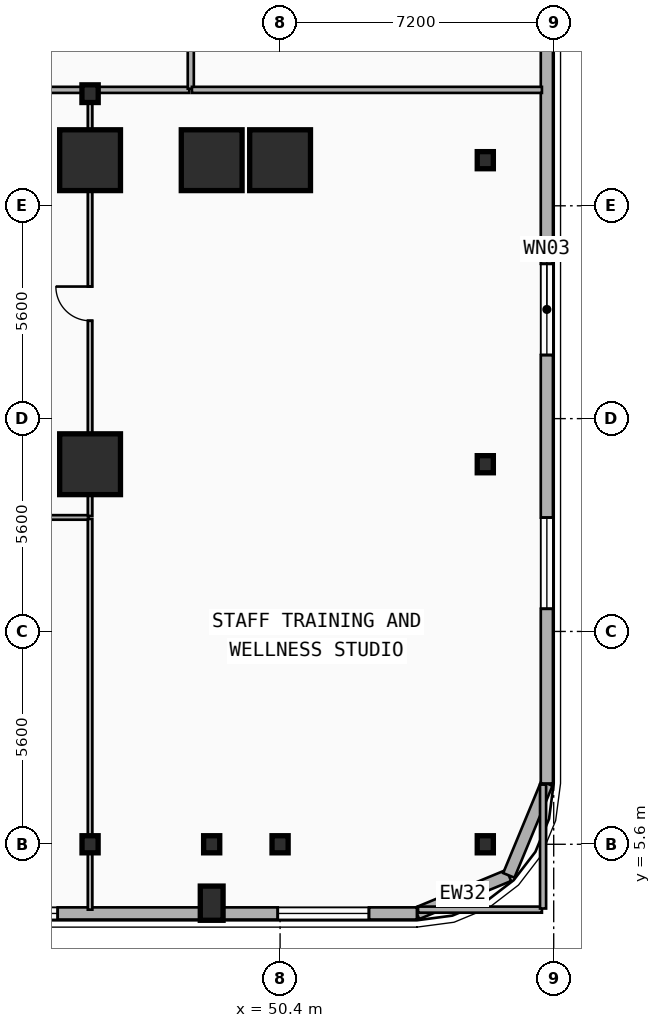
"""IFC4 building model, lengths in metres.
Left out: names, types, materials, properties, quantities, classifications, styles, units other than length and angle.
Written with IfcOpenShell. Run it as: python <this file> out.ifc"""

import sys

from ifc_helpers import new_model, si_unit, direction, frame, frame_2d, origin, origin_2d, place, context, subcontext, project, spatial, rectangle, i_section, extrude, element, fill, save


model = new_model("IFC4")
c1 = context("Model", 3, precision=1e-05, world=origin(), true_north=direction((0.0, 1.0)))
c2 = subcontext(c1, "Body", "Model", "MODEL_VIEW")
j1 = project(units=[si_unit("LENGTHUNIT", "METRE"), si_unit("PLANEANGLEUNIT", "RADIAN")], contexts=[c1])
p1 = place(None, origin())
s1 = spatial("IfcSite", under=j1, at=p1, CompositionType="ELEMENT")
p2 = place(p1, origin())
s2 = spatial("IfcBuilding", under=s1, at=p2, CompositionType="ELEMENT")
p3 = place(p2, frame((0.0, 0.0, 24.2)))
s3 = spatial("IfcBuildingStorey", under=s2, at=p3, CompositionType="ELEMENT", Elevation=24.2)
p4 = place(p3, frame((45.4, 25.35, 0.0), z_axis=(0.0, 0.0, 1.0), x_axis=(1.0, 0.0, 0.0)))
e1 = element("IfcColumn", 1, at=p4, inside=s3, PredefinedType="COLUMN", context=c2, shape_type="SweptSolid", body=[
    extrude(i_section(OverallWidth=0.428, OverallDepth=0.465, WebThickness=0.045, FlangeThickness=0.073, FilletRadius=0.015, at=origin_2d()), origin(), (0.0, 0.0, 1.0), 4.8),
])
p5 = place(p3, frame((45.4, 5.6, 0.0), z_axis=(0.0, 0.0, 1.0), x_axis=(1.0, 0.0, 0.0)))
e2 = element("IfcColumn", 2, at=p5, inside=s3, PredefinedType="COLUMN", context=c2, shape_type="SweptSolid", body=[
    extrude(i_section(OverallWidth=0.424, OverallDepth=0.45, WebThickness=0.041, FlangeThickness=0.065, FilletRadius=0.015, at=origin_2d()), origin(), (0.0, 0.0, 1.0), 4.8),
])
p6 = place(p3, frame((45.4, 15.6, 0.0), z_axis=(0.0, 0.0, 1.0), x_axis=(1.0, 0.0, 0.0)))
e3 = element("IfcColumn", 3, at=p6, inside=s3, PredefinedType="COLUMN", context=c2, shape_type="SweptSolid", body=[
    extrude(rectangle(XDim=1.6, YDim=1.6, at=origin_2d()), origin(), (0.0, 0.0, 1.0), 4.8),
])
p7 = place(p3, frame((45.4, 23.6, 0.0), z_axis=(0.0, 0.0, 1.0), x_axis=(1.0, 0.0, 0.0)))
e4 = element("IfcColumn", 4, at=p7, inside=s3, PredefinedType="COLUMN", context=c2, shape_type="SweptSolid", body=[
    extrude(rectangle(XDim=1.6, YDim=1.6, at=origin_2d()), origin(), (0.0, 0.0, 1.0), 4.732),
])
p8 = place(p3, frame((48.6, 5.6, 0.0), z_axis=(0.0, 0.0, 1.0), x_axis=(1.0, 0.0, 0.0)))
e5 = element("IfcColumn", 5, at=p8, inside=s3, PredefinedType="COLUMN", context=c2, shape_type="SweptSolid", body=[
    extrude(i_section(OverallWidth=0.424, OverallDepth=0.45, WebThickness=0.041, FlangeThickness=0.065, FilletRadius=0.015, at=origin_2d()), origin(), (0.0, 0.0, 1.0), 4.8),
])
p9 = place(p3, frame((48.6, 23.6, 0.0), z_axis=(0.0, 0.0, 1.0), x_axis=(1.0, 0.0, 0.0)))
e6 = element("IfcColumn", 6, at=p9, inside=s3, PredefinedType="COLUMN", context=c2, shape_type="SweptSolid", body=[
    extrude(rectangle(XDim=1.6, YDim=1.6, at=origin_2d()), origin(), (0.0, 0.0, 1.0), 4.8),
])
p10 = place(p3, frame((50.4, 5.6, 0.0), z_axis=(0.0, 0.0, 1.0), x_axis=(1.0, 0.0, 0.0)))
e7 = element("IfcColumn", 7, at=p10, inside=s3, PredefinedType="COLUMN", context=c2, shape_type="SweptSolid", body=[
    extrude(i_section(OverallWidth=0.424, OverallDepth=0.45, WebThickness=0.041, FlangeThickness=0.065, FilletRadius=0.015, at=origin_2d()), origin(), (0.0, 0.0, 1.0), 4.8),
])
p11 = place(p3, frame((50.4, 23.6, 0.0), z_axis=(0.0, 0.0, 1.0), x_axis=(1.0, 0.0, 0.0)))
e8 = element("IfcColumn", 8, at=p11, inside=s3, PredefinedType="COLUMN", context=c2, shape_type="SweptSolid", body=[
    extrude(rectangle(XDim=1.6, YDim=1.6, at=origin_2d()), origin(), (0.0, 0.0, 1.0), 4.732),
])
for number, where, z_axis, x_axis in (
    (9, (55.8, 5.6, 0.0), (0.0, 0.0, 1.0), (1.0, 0.0, 0.0)),
    (10, (55.8, 15.6, 0.0), (0.0, 0.0, 1.0), (1.0, 0.0, 0.0)),
    (11, (55.8, 23.6, 0.0), (0.0, 0.0, 1.0), (1.0, 0.0, 0.0)),
):
    element("IfcColumn", number, at=place(p3, frame(where, z_axis=z_axis, x_axis=x_axis)), inside=s3, PredefinedType="COLUMN", context=c2, shape_type="SweptSolid", body=[
        extrude(i_section(OverallWidth=0.424, OverallDepth=0.45, WebThickness=0.041, FlangeThickness=0.065, FilletRadius=0.015, at=origin_2d()), origin(), (0.0, 0.0, 1.0), 4.8),
    ])
p12 = place(p3, frame((48.6, 4.05, 0.0), z_axis=(0.0, 0.0, 1.0), x_axis=(1.0, 0.0, 0.0)))
e12 = element("IfcColumn", 12, at=p12, inside=s3, PredefinedType="PILASTER", context=c2, shape_type="SweptSolid", body=[
    extrude(rectangle(XDim=0.6, YDim=0.9, at=origin_2d()), origin(), (0.0, 0.0, 1.0), 4.8),
])
for number, where, z_axis, x_axis in (
    (13, (56.418, 4.782, 0.0), (0.0, 0.0, 1.0), (-0.924, -0.383, 0.0)),
    (14, (57.42, 7.2, 0.0), (0.0, 0.0, 1.0), (-0.383, -0.924, 0.0)),
):
    element("IfcWall", number, at=place(p3, frame(where, z_axis=z_axis, x_axis=x_axis)), inside=s3, PredefinedType="SOLIDWALL", context=c2, shape_type="SweptSolid", body=[
        extrude(rectangle(XDim=2.617, YDim=0.32, at=frame_2d((1.309, 0.0))), origin(), (0.0, 0.0, 1.0), 4.48),
    ])
p13 = place(p3, frame((57.42, 41.6, 0.0), z_axis=(0.0, 0.0, 1.0), x_axis=(0.0, -1.0, 0.0)))
e15 = element("IfcWall", 15, at=p13, inside=s3, PredefinedType="SOLIDWALL", context=c2, shape_type="SweptSolid", body=[
    extrude(rectangle(XDim=34.4, YDim=0.32, at=frame_2d((17.2, 0.0))), origin(), (0.0, 0.0, 1.0), 4.48),
])
p14 = place(p13, frame((20.727, 0.0, 0.9)))
e16 = element("IfcOpeningElement", 16, at=p14, cuts=e15, PredefinedType="OPENING", context=c2, shape_type="SweptSolid", body=[
    extrude(rectangle(XDim=2.4, YDim=1.8, at=frame_2d((1.2, 0.9))), frame((0.0, 0.17, 0.0), z_axis=(0.0, -1.0, 0.0), x_axis=(1.0, 0.0, 0.0)), (0.0, 0.0, 1.0), 0.34),
])
p15 = place(p13, frame((27.403, 0.0, 0.9)))
e17 = element("IfcOpeningElement", 17, at=p15, cuts=e15, PredefinedType="OPENING", context=c2, shape_type="SweptSolid", body=[
    extrude(rectangle(XDim=2.4, YDim=1.8, at=frame_2d((1.2, 0.9))), frame((0.0, 0.17, 0.0), z_axis=(0.0, -1.0, 0.0), x_axis=(1.0, 0.0, 0.0)), (0.0, 0.0, 1.0), 0.34),
])
p16 = place(p3, frame((54.0, 3.78, 0.0), z_axis=(0.0, 0.0, 1.0), x_axis=(-1.0, 0.0, 0.0)))
e18 = element("IfcWall", 18, at=p16, inside=s3, PredefinedType="SOLIDWALL", context=c2, shape_type="SweptSolid", body=[
    extrude(rectangle(XDim=16.95, YDim=0.32, at=frame_2d((8.475, 0.0))), origin(), (0.0, 0.0, 1.0), 4.48),
])
p17 = place(p16, frame((9.452, 0.0, 0.9)))
e19 = element("IfcOpeningElement", 19, at=p17, cuts=e18, PredefinedType="OPENING", context=c2, shape_type="SweptSolid", body=[
    extrude(rectangle(XDim=2.4, YDim=1.8, at=frame_2d((1.2, 0.9))), frame((0.0, 0.17, 0.0), z_axis=(0.0, -1.0, 0.0), x_axis=(1.0, 0.0, 0.0)), (0.0, 0.0, 1.0), 0.34),
])
p18 = place(p16, frame((1.262, 0.0, 0.9)))
e20 = element("IfcOpeningElement", 20, at=p18, cuts=e18, PredefinedType="OPENING", context=c2, shape_type="SweptSolid", body=[
    extrude(rectangle(XDim=2.4, YDim=1.8, at=frame_2d((1.2, 0.9))), frame((0.0, 0.17, 0.0), z_axis=(0.0, -1.0, 0.0), x_axis=(1.0, 0.0, 0.0)), (0.0, 0.0, 1.0), 0.34),
])
p19 = place(p3, frame((36.39, 25.45, 0.0), z_axis=(0.0, 0.0, 1.0), x_axis=(1.0, 0.0, 0.0)))
e21 = element("IfcWall", 21, at=p19, inside=s3, PredefinedType="PARTITIONING", context=c2, shape_type="SweptSolid", body=[
    extrude(rectangle(XDim=8.97, YDim=0.16, at=frame_2d((4.485, 0.0))), origin(), (0.0, 0.0, 1.0), 3.452),
])
p20 = place(p19, frame((3.985, 0.0, 0.0)))
e22 = element("IfcOpeningElement", 22, at=p20, cuts=e21, PredefinedType="OPENING", context=c2, shape_type="SweptSolid", body=[
    extrude(rectangle(XDim=1.0, YDim=2.15, at=frame_2d((0.5, 1.075))), frame((0.0, 0.09, 0.0), z_axis=(0.0, -1.0, 0.0), x_axis=(1.0, 0.0, 0.0)), (0.0, 0.0, 1.0), 0.18),
])
p21 = place(p3, frame((45.44, 25.45, 0.0), z_axis=(0.0, 0.0, 1.0), x_axis=(1.0, 0.0, 0.0)))
e23 = element("IfcWall", 23, at=p21, inside=s3, PredefinedType="PARTITIONING", context=c2, shape_type="SweptSolid", body=[
    extrude(rectangle(XDim=2.57, YDim=0.16, at=frame_2d((1.285, 0.0))), origin(), (0.0, 0.0, 1.0), 3.452),
])
p22 = place(p3, frame((36.39, 14.2, 0.0), z_axis=(0.0, 0.0, 1.0), x_axis=(1.0, 0.0, 0.0)))
e24 = element("IfcWall", 24, at=p22, inside=s3, PredefinedType="PARTITIONING", context=c2, shape_type="SweptSolid", body=[
    extrude(rectangle(XDim=8.97, YDim=0.12, at=frame_2d((4.485, 0.0))), origin(), (0.0, 0.0, 1.0), 3.452),
])
p23 = place(p22, frame((4.035, 0.0, 0.0)))
e25 = element("IfcOpeningElement", 25, at=p23, cuts=e24, PredefinedType="OPENING", context=c2, shape_type="SweptSolid", body=[
    extrude(rectangle(XDim=0.9, YDim=2.1, at=frame_2d((0.45, 1.05))), frame((0.0, 0.07, 0.0), z_axis=(0.0, -1.0, 0.0), x_axis=(1.0, 0.0, 0.0)), (0.0, 0.0, 1.0), 0.14),
])
p24 = place(p3, frame((45.4, 3.88, 0.0), z_axis=(0.0, 0.0, 1.0), x_axis=(0.0, 1.0, 0.0)))
e26 = element("IfcWall", 26, at=p24, inside=s3, PredefinedType="PARTITIONING", context=c2, shape_type="SweptSolid", body=[
    extrude(rectangle(XDim=10.28, YDim=0.12, at=frame_2d((5.14, 0.0))), origin(), (0.0, 0.0, 1.0), 3.452),
])
p25 = place(p3, frame((45.4, 14.24, 0.0), z_axis=(0.0, 0.0, 1.0), x_axis=(0.0, 1.0, 0.0)))
e27 = element("IfcWall", 27, at=p25, inside=s3, PredefinedType="PARTITIONING", context=c2, shape_type="SweptSolid", body=[
    extrude(rectangle(XDim=11.17, YDim=0.12, at=frame_2d((5.585, 0.0))), origin(), (0.0, 0.0, 1.0), 3.452),
])
p26 = place(p25, frame((5.135, 0.0, 0.0)))
e28 = element("IfcOpeningElement", 28, at=p26, cuts=e27, PredefinedType="OPENING", context=c2, shape_type="SweptSolid", body=[
    extrude(rectangle(XDim=0.9, YDim=2.1, at=frame_2d((0.45, 1.05))), frame((0.0, 0.07, 0.0), z_axis=(0.0, -1.0, 0.0), x_axis=(1.0, 0.0, 0.0)), (0.0, 0.0, 1.0), 0.14),
])
p27 = place(p3, frame((48.05, 25.48, 0.0), z_axis=(0.0, 0.0, 1.0), x_axis=(0.0, 1.0, 0.0)))
e29 = element("IfcWall", 29, at=p27, inside=s3, PredefinedType="PARTITIONING", context=c2, shape_type="SweptSolid", body=[
    extrude(rectangle(XDim=2.09, YDim=0.16, at=frame_2d((1.045, 0.0))), origin(), (0.0, 0.0, 1.0), 4.48),
])
p28 = place(p3, frame((54.03, 3.88, 0.0), z_axis=(0.0, 0.0, 1.0), x_axis=(1.0, 0.0, 0.0)))
e30 = element("IfcWall", 30, at=p28, inside=s3, PredefinedType="PARTITIONING", context=c2, shape_type="SweptSolid", body=[
    extrude(rectangle(XDim=3.26, YDim=0.16, at=frame_2d((1.63, 0.0))), origin(), (0.0, 0.0, 1.0), 4.48),
])
p29 = place(p3, frame((48.08, 25.45, 0.0), z_axis=(0.0, 0.0, 1.0), x_axis=(1.0, 0.0, 0.0)))
e31 = element("IfcWall", 31, at=p29, inside=s3, PredefinedType="PARTITIONING", context=c2, shape_type="SweptSolid", body=[
    extrude(rectangle(XDim=9.21, YDim=0.16, at=frame_2d((4.605, 0.0))), origin(), (0.0, 0.0, 1.0), 4.48),
])
p30 = place(p3, frame((57.32, 3.91, 0.0), z_axis=(0.0, 0.0, 1.0), x_axis=(0.0, 1.0, 0.0)))
e32 = element("IfcWall", 32, at=p30, inside=s3, PredefinedType="PARTITIONING", context=c2, shape_type="SweptSolid", body=[
    extrude(rectangle(XDim=3.26, YDim=0.16, at=frame_2d((1.63, 0.0))), origin(), (0.0, 0.0, 1.0), 4.48),
])
p31 = place(p14, origin())
e33 = element("IfcWindow", 33, at=p31, inside=s3, PartitioningType="SINGLE_PANEL", PredefinedType="WINDOW", context=c2, shape_type="SweptSolid", body=[
    extrude(rectangle(XDim=2.4, YDim=1.8, at=frame_2d((1.2, 0.9))), frame((0.0, 0.03, 0.0), z_axis=(0.0, -1.0, 0.0), x_axis=(1.0, 0.0, 0.0)), (0.0, 0.0, 1.0), 0.06),
])
fill(e16, e33)
p32 = place(p15, origin())
e34 = element("IfcWindow", 34, at=p32, inside=s3, PartitioningType="SINGLE_PANEL", PredefinedType="WINDOW", context=c2, shape_type="SweptSolid", body=[
    extrude(rectangle(XDim=2.4, YDim=1.8, at=frame_2d((1.2, 0.9))), frame((0.0, 0.03, 0.0), z_axis=(0.0, -1.0, 0.0), x_axis=(1.0, 0.0, 0.0)), (0.0, 0.0, 1.0), 0.06),
])
fill(e17, e34)
p33 = place(p17, origin())
e35 = element("IfcWindow", 35, at=p33, inside=s3, PartitioningType="SINGLE_PANEL", PredefinedType="WINDOW", context=c2, shape_type="SweptSolid", body=[
    extrude(rectangle(XDim=2.4, YDim=1.8, at=frame_2d((1.2, 0.9))), frame((0.0, 0.03, 0.0), z_axis=(0.0, -1.0, 0.0), x_axis=(1.0, 0.0, 0.0)), (0.0, 0.0, 1.0), 0.06),
])
fill(e19, e35)
p34 = place(p18, origin())
e36 = element("IfcWindow", 36, at=p34, inside=s3, PartitioningType="SINGLE_PANEL", PredefinedType="WINDOW", context=c2, shape_type="SweptSolid", body=[
    extrude(rectangle(XDim=2.4, YDim=1.8, at=frame_2d((1.2, 0.9))), frame((0.0, 0.03, 0.0), z_axis=(0.0, -1.0, 0.0), x_axis=(1.0, 0.0, 0.0)), (0.0, 0.0, 1.0), 0.06),
])
fill(e20, e36)
p35 = place(p26, origin())
e37 = element("IfcDoor", 37, at=p35, inside=s3, OperationType="SINGLE_SWING_RIGHT", PredefinedType="DOOR", context=c2, shape_type="SweptSolid", body=[
    extrude(rectangle(XDim=0.9, YDim=2.1, at=frame_2d((0.45, 1.05))), frame((0.0, 0.025, 0.0), z_axis=(0.0, -1.0, 0.0), x_axis=(1.0, 0.0, 0.0)), (0.0, 0.0, 1.0), 0.05),
])
fill(e28, e37)
save(model, sys.argv[1])
